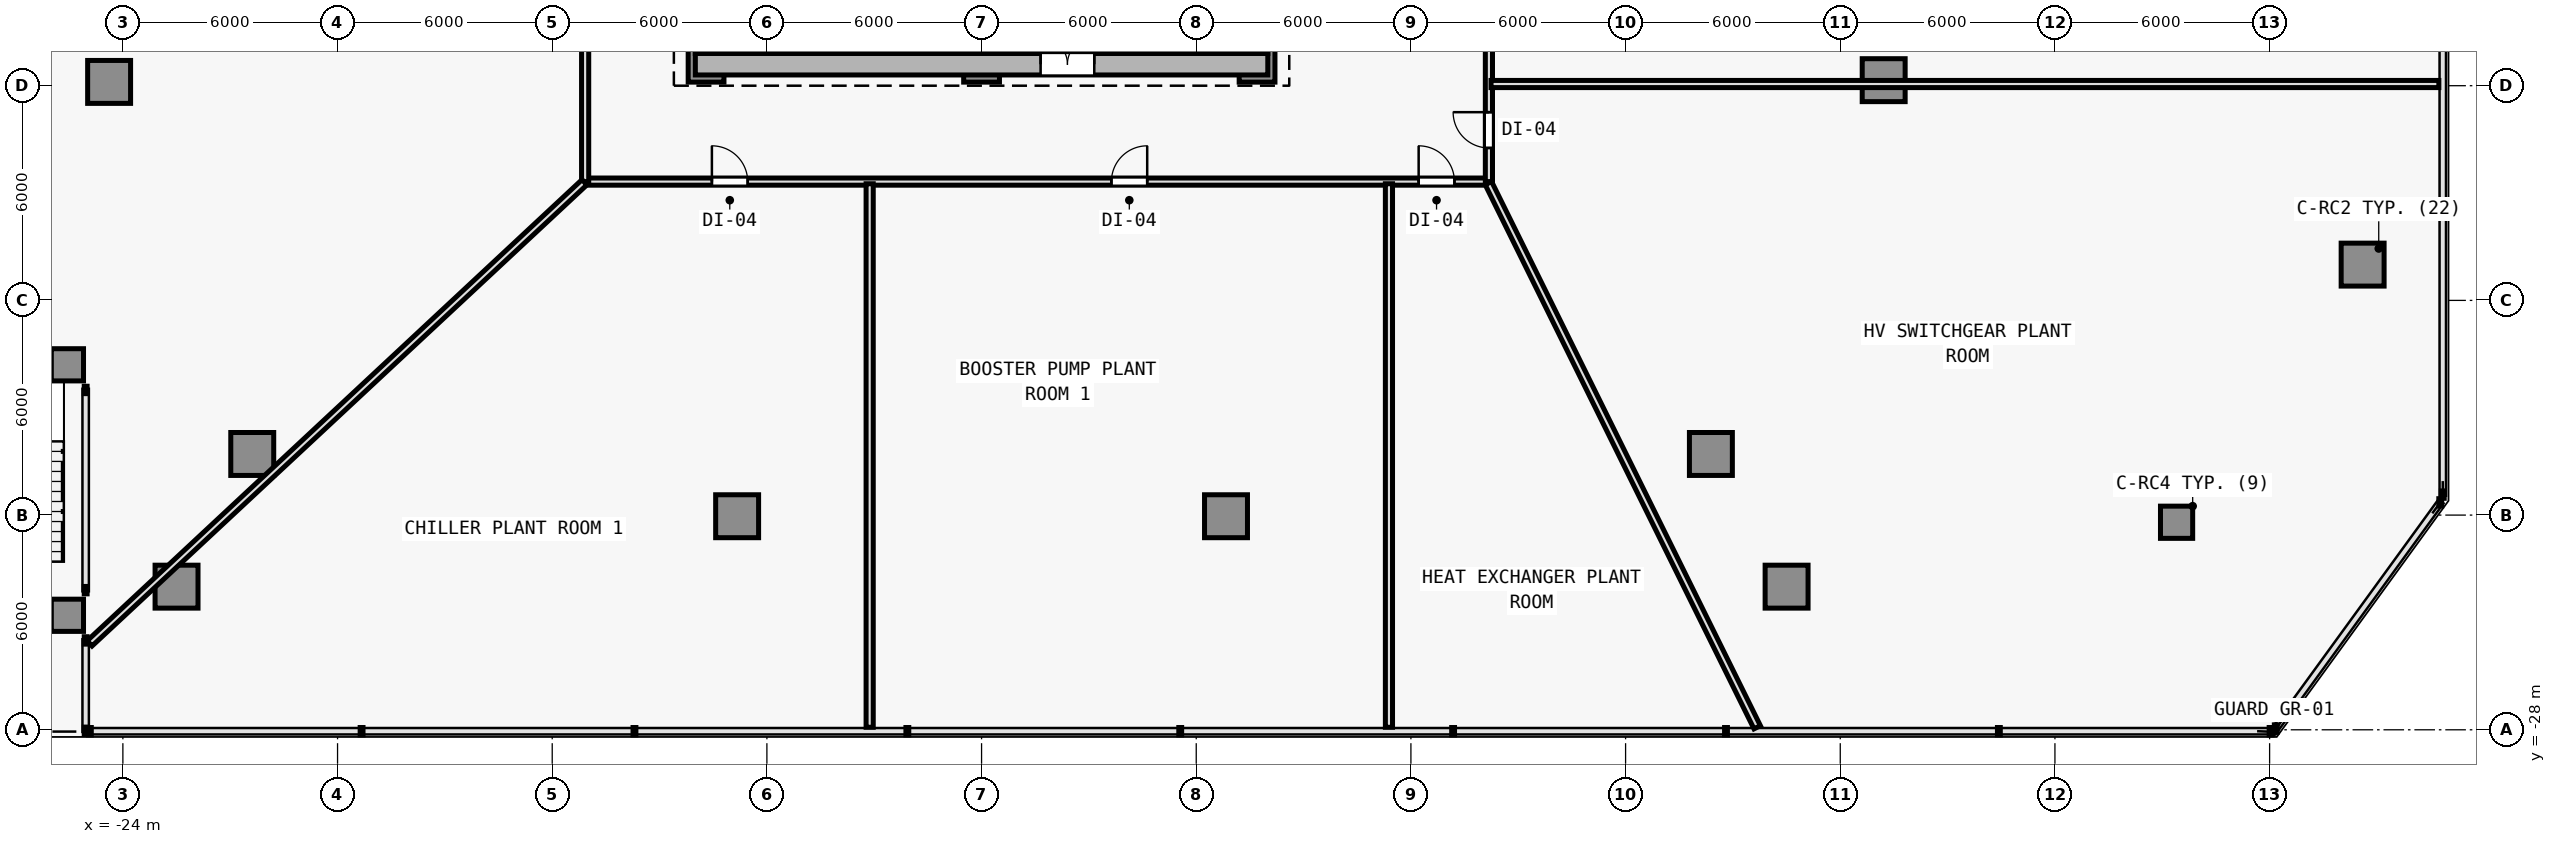
"""IFC4 building model, lengths in metres.
Left out: names, types, materials, properties, quantities, classifications, styles, units other than length and angle.
Written with IfcOpenShell. Run it as: python <this file> out.ifc"""

import sys

from ifc_helpers import new_model, si_unit, direction, frame, frame_2d, origin, origin_2d, place, context, subcontext, project, spatial, rectangle, extrude, element, fill, save


model = new_model("IFC4")
c1 = context("Model", 3, precision=1e-05, world=origin(), true_north=direction((0.0, 1.0)))
c2 = subcontext(c1, "Body", "Model", "MODEL_VIEW")
j1 = project(units=[si_unit("LENGTHUNIT", "METRE"), si_unit("PLANEANGLEUNIT", "RADIAN")], contexts=[c1])
p1 = place(None, origin())
s1 = spatial("IfcSite", under=j1, at=p1, CompositionType="ELEMENT")
p2 = place(p1, origin())
s2 = spatial("IfcBuilding", under=s1, at=p2, CompositionType="ELEMENT")
p3 = place(p2, frame((0.0, 0.0, 21.8)))
s3 = spatial("IfcBuildingStorey", under=s2, at=p3, CompositionType="ELEMENT", Elevation=21.8)
for number, where, z_axis, x_axis in (
    (1, (-7.7, -9.4, 0.0), (0.0, 0.0, 1.0), (1.0, 0.0, 0.0)),
    (2, (7.7, -9.4, 0.0), (0.0, 0.0, 1.0), (1.0, 0.0, 0.0)),
    (3, (0.0, -9.4, 0.0), (0.0, 0.0, 1.0), (1.0, 0.0, 0.0)),
):
    element("IfcColumn", number, at=place(p3, frame(where, z_axis=z_axis, x_axis=x_axis)), inside=s3, PredefinedType="COLUMN", context=c2, shape_type="SweptSolid", body=[
        extrude(rectangle(XDim=1.0, YDim=1.0, at=origin_2d()), origin(), (0.0, 0.0, 1.0), 4.6),
    ])
for number, where, z_axis, x_axis in (
    (4, (38.6, -15.0, 0.0), (0.0, 0.0, 1.0), (1.0, 0.0, 0.0)),
    (5, (-22.5, -24.0, 0.0), (0.0, 0.0, 1.0), (1.0, 0.0, 0.0)),
    (6, (22.5, -24.0, 0.0), (0.0, 0.0, 1.0), (1.0, 0.0, 0.0)),
    (7, (-20.384, -20.292, 0.0), (0.0, 0.0, 1.0), (1.0, 0.0, 0.0)),
    (8, (-6.832, -22.032, 0.0), (0.0, 0.0, 1.0), (1.0, 0.0, 0.0)),
    (9, (6.832, -22.032, 0.0), (0.0, 0.0, 1.0), (1.0, 0.0, 0.0)),
    (10, (20.384, -20.292, 0.0), (0.0, 0.0, 1.0), (1.0, 0.0, 0.0)),
    (11, (25.213, -9.845, 0.0), (0.0, 0.0, 1.0), (1.0, 0.0, 0.0)),
    (12, (-24.385, -9.894, 0.0), (0.0, 0.0, 1.0), (1.0, 0.0, 0.0)),
):
    element("IfcColumn", number, at=place(p3, frame(where, z_axis=z_axis, x_axis=x_axis)), inside=s3, PredefinedType="COLUMN", context=c2, shape_type="SweptSolid", body=[
        extrude(rectangle(XDim=1.2, YDim=1.2, at=origin_2d()), origin(), (0.0, 0.0, 1.0), 4.6),
    ])
for number, where, z_axis, x_axis in (
    (13, (33.4, -22.2, 0.0), (0.0, 0.0, 1.0), (1.0, 0.0, 0.0)),
    (14, (-25.55, -24.8, 0.0), (0.0, 0.0, 1.0), (1.0, 0.0, 0.0)),
    (15, (-25.55, -17.8, 0.0), (0.0, 0.0, 1.0), (1.0, 0.0, 0.0)),
):
    element("IfcColumn", number, at=place(p3, frame(where, z_axis=z_axis, x_axis=x_axis)), inside=s3, PredefinedType="COLUMN", context=c2, shape_type="SweptSolid", body=[
        extrude(rectangle(XDim=0.9, YDim=0.9, at=origin_2d()), origin(), (0.0, 0.0, 1.0), 4.6),
    ])
p4 = place(p3, frame((-8.0, -9.4, 0.0), z_axis=(0.0, 0.0, 1.0), x_axis=(1.0, 0.0, 0.0)))
e16 = element("IfcWall", 16, at=p4, inside=s3, PredefinedType="SHEAR", context=c2, shape_type="SweptSolid", body=[
    extrude(rectangle(XDim=16.0, YDim=0.6, at=frame_2d((8.0, 0.0))), origin(), (0.0, 0.0, 1.0), 4.35),
])
p5 = place(p4, frame((9.65, 0.0, 0.0)))
e17 = element("IfcOpeningElement", 17, at=p5, cuts=e16, PredefinedType="OPENING", context=c2, shape_type="SweptSolid", body=[
    extrude(rectangle(XDim=1.5, YDim=2.2, at=frame_2d((0.75, 1.1))), frame((0.0, 0.31, 0.0), z_axis=(0.0, -1.0, 0.0), x_axis=(1.0, 0.0, 0.0)), (0.0, 0.0, 1.0), 0.62),
])
p6 = place(p3, frame((-7.7, -9.1, 0.0), z_axis=(0.0, 0.0, 1.0), x_axis=(0.0, 1.0, 0.0)))
e18 = element("IfcWall", 18, at=p6, inside=s3, PredefinedType="SHEAR", context=c2, shape_type="SweptSolid", body=[
    extrude(rectangle(XDim=19.0, YDim=0.6, at=frame_2d((9.5, 0.0))), origin(), (0.0, 0.0, 1.0), 4.35),
])
p7 = place(p6, frame((12.65, 0.0, 0.0)))
e19 = element("IfcOpeningElement", 19, at=p7, cuts=e18, PredefinedType="OPENING", context=c2, shape_type="SweptSolid", body=[
    extrude(rectangle(XDim=1.1, YDim=2.15, at=frame_2d((0.55, 1.075))), frame((0.0, 0.31, 0.0), z_axis=(0.0, -1.0, 0.0), x_axis=(1.0, 0.0, 0.0)), (0.0, 0.0, 1.0), 0.62),
])
p8 = place(p3, frame((7.7, 9.9, 0.0), z_axis=(0.0, 0.0, 1.0), x_axis=(0.0, -1.0, 0.0)))
e20 = element("IfcWall", 20, at=p8, inside=s3, PredefinedType="SHEAR", context=c2, shape_type="SweptSolid", body=[
    extrude(rectangle(XDim=19.0, YDim=0.6, at=frame_2d((9.5, 0.0))), origin(), (0.0, 0.0, 1.0), 4.35),
])
p9 = place(p3, frame((-1.25, -9.095, 0.0), z_axis=(0.0, 0.0, 1.0), x_axis=(0.0, 1.0, 0.0)))
e21 = element("IfcWall", 21, at=p9, inside=s3, PredefinedType="PARTITIONING", context=c2, shape_type="SweptSolid", body=[
    extrude(rectangle(XDim=3.045, YDim=0.15, at=frame_2d((1.522, 0.0))), origin(), (0.0, 0.0, 1.0), 4.35),
])
p10 = place(p9, frame((0.845, 0.0, 0.0)))
e22 = element("IfcOpeningElement", 22, at=p10, cuts=e21, PredefinedType="OPENING", context=c2, shape_type="SweptSolid", body=[
    extrude(rectangle(XDim=0.95, YDim=2.1, at=frame_2d((0.475, 1.05))), frame((0.0, 0.085, 0.0), z_axis=(0.0, -1.0, 0.0), x_axis=(1.0, 0.0, 0.0)), (0.0, 0.0, 1.0), 0.17),
])
p11 = place(p3, frame((4.15, -9.095, 0.0), z_axis=(0.0, 0.0, 1.0), x_axis=(0.0, 1.0, 0.0)))
e23 = element("IfcWall", 23, at=p11, inside=s3, PredefinedType="PARTITIONING", context=c2, shape_type="SweptSolid", body=[
    extrude(rectangle(XDim=3.045, YDim=0.15, at=frame_2d((1.522, 0.0))), origin(), (0.0, 0.0, 1.0), 4.35),
])
p12 = place(p11, frame((0.845, 0.0, 0.0)))
e24 = element("IfcOpeningElement", 24, at=p12, cuts=e23, PredefinedType="OPENING", context=c2, shape_type="SweptSolid", body=[
    extrude(rectangle(XDim=0.9, YDim=2.1, at=frame_2d((0.45, 1.05))), frame((0.0, 0.085, 0.0), z_axis=(0.0, -1.0, 0.0), x_axis=(1.0, 0.0, 0.0)), (0.0, 0.0, 1.0), 0.17),
])
p13 = place(p3, frame((-4.3, -9.095, 0.0), z_axis=(0.0, 0.0, 1.0), x_axis=(0.0, 1.0, 0.0)))
e25 = element("IfcWall", 25, at=p13, inside=s3, PredefinedType="PARTITIONING", context=c2, shape_type="SweptSolid", body=[
    extrude(rectangle(XDim=3.045, YDim=0.15, at=frame_2d((1.522, 0.0))), origin(), (0.0, 0.0, 1.0), 4.35),
])
p14 = place(p13, frame((0.845, 0.0, 0.0)))
e26 = element("IfcOpeningElement", 26, at=p14, cuts=e25, PredefinedType="OPENING", context=c2, shape_type="SweptSolid", body=[
    extrude(rectangle(XDim=0.9, YDim=2.1, at=frame_2d((0.45, 1.05))), frame((0.0, 0.085, 0.0), z_axis=(0.0, -1.0, 0.0), x_axis=(1.0, 0.0, 0.0)), (0.0, 0.0, 1.0), 0.17),
])
p15 = place(p3, frame((-11.1, -12.68, 0.0), z_axis=(0.0, 0.0, 1.0), x_axis=(1.0, 0.0, 0.0)))
e27 = element("IfcWall", 27, at=p15, inside=s3, PredefinedType="SOLIDWALL", context=c2, shape_type="SweptSolid", body=[
    extrude(rectangle(XDim=25.3, YDim=0.2, at=frame_2d((12.65, 0.0))), origin(), (0.0, 0.0, 1.0), 3.317),
])
p16 = place(p15, frame((3.563, 0.0, 0.0)))
e28 = element("IfcOpeningElement", 28, at=p16, cuts=e27, PredefinedType="OPENING", context=c2, shape_type="SweptSolid", body=[
    extrude(rectangle(XDim=1.0, YDim=2.15, at=frame_2d((0.5, 1.075))), frame((0.0, 0.11, 0.0), z_axis=(0.0, -1.0, 0.0), x_axis=(1.0, 0.0, 0.0)), (0.0, 0.0, 1.0), 0.22),
])
p17 = place(p15, frame((14.729, 0.0, 0.0)))
e29 = element("IfcOpeningElement", 29, at=p17, cuts=e27, PredefinedType="OPENING", context=c2, shape_type="SweptSolid", body=[
    extrude(rectangle(XDim=1.0, YDim=2.15, at=frame_2d((0.5, 1.075))), frame((0.0, 0.11, 0.0), z_axis=(0.0, -1.0, 0.0), x_axis=(1.0, 0.0, 0.0)), (0.0, 0.0, 1.0), 0.22),
])
p18 = place(p15, frame((23.316, 0.0, 0.0)))
e30 = element("IfcOpeningElement", 30, at=p18, cuts=e27, PredefinedType="OPENING", context=c2, shape_type="SweptSolid", body=[
    extrude(rectangle(XDim=1.0, YDim=2.15, at=frame_2d((0.5, 1.075))), frame((0.0, 0.11, 0.0), z_axis=(0.0, -1.0, 0.0), x_axis=(1.0, 0.0, 0.0)), (0.0, 0.0, 1.0), 0.22),
])
p19 = place(p3, frame((-11.08, -12.68, 0.0), z_axis=(0.0, 0.0, 1.0), x_axis=(0.0, 1.0, 0.0)))
e31 = element("IfcWall", 31, at=p19, inside=s3, PredefinedType="SOLIDWALL", context=c2, shape_type="SweptSolid", body=[
    extrude(rectangle(XDim=26.16, YDim=0.2, at=frame_2d((13.08, 0.0))), origin(), (0.0, 0.0, 1.0), 3.025),
])
p20 = place(p19, frame((4.02, 0.0, 0.0)))
e32 = element("IfcOpeningElement", 32, at=p20, cuts=e31, PredefinedType="OPENING", context=c2, shape_type="SweptSolid", body=[
    extrude(rectangle(XDim=1.0, YDim=2.15, at=frame_2d((0.5, 1.075))), frame((0.0, 0.11, 0.0), z_axis=(0.0, -1.0, 0.0), x_axis=(1.0, 0.0, 0.0)), (0.0, 0.0, 1.0), 0.22),
])
p21 = place(p19, frame((24.22, 0.0, 0.0)))
e33 = element("IfcOpeningElement", 33, at=p21, cuts=e31, PredefinedType="OPENING", context=c2, shape_type="SweptSolid", body=[
    extrude(rectangle(XDim=1.0, YDim=2.15, at=frame_2d((0.5, 1.075))), frame((0.0, 0.11, 0.0), z_axis=(0.0, -1.0, 0.0), x_axis=(1.0, 0.0, 0.0)), (0.0, 0.0, 1.0), 0.22),
])
p22 = place(p19, frame((15.66, 0.0, 0.0)))
e34 = element("IfcOpeningElement", 34, at=p22, cuts=e31, PredefinedType="OPENING", context=c2, shape_type="SweptSolid", body=[
    extrude(rectangle(XDim=1.0, YDim=2.15, at=frame_2d((0.5, 1.075))), frame((0.0, 0.11, 0.0), z_axis=(0.0, -1.0, 0.0), x_axis=(1.0, 0.0, 0.0)), (0.0, 0.0, 1.0), 0.22),
])
p23 = place(p3, frame((14.18, -12.68, 0.0), z_axis=(0.0, 0.0, 1.0), x_axis=(0.0, 1.0, 0.0)))
e35 = element("IfcWall", 35, at=p23, inside=s3, PredefinedType="SOLIDWALL", context=c2, shape_type="SweptSolid", body=[
    extrude(rectangle(XDim=26.16, YDim=0.2, at=frame_2d((13.08, 0.0))), origin(), (0.0, 0.0, 1.0), 3.025),
])
p24 = place(p23, frame((0.94, 0.0, 0.0)))
e36 = element("IfcOpeningElement", 36, at=p24, cuts=e35, PredefinedType="OPENING", context=c2, shape_type="SweptSolid", body=[
    extrude(rectangle(XDim=1.0, YDim=2.15, at=frame_2d((0.5, 1.075))), frame((0.0, 0.11, 0.0), z_axis=(0.0, -1.0, 0.0), x_axis=(1.0, 0.0, 0.0)), (0.0, 0.0, 1.0), 0.22),
])
p25 = place(p23, frame((9.5, 0.0, 0.0)))
e37 = element("IfcOpeningElement", 37, at=p25, cuts=e35, PredefinedType="OPENING", context=c2, shape_type="SweptSolid", body=[
    extrude(rectangle(XDim=1.0, YDim=2.15, at=frame_2d((0.5, 1.075))), frame((0.0, 0.11, 0.0), z_axis=(0.0, -1.0, 0.0), x_axis=(1.0, 0.0, 0.0)), (0.0, 0.0, 1.0), 0.22),
])
p26 = place(p23, frame((21.14, 0.0, 0.0)))
e38 = element("IfcOpeningElement", 38, at=p26, cuts=e35, PredefinedType="OPENING", context=c2, shape_type="SweptSolid", body=[
    extrude(rectangle(XDim=1.0, YDim=2.15, at=frame_2d((0.5, 1.075))), frame((0.0, 0.11, 0.0), z_axis=(0.0, -1.0, 0.0), x_axis=(1.0, 0.0, 0.0)), (0.0, 0.0, 1.0), 0.22),
])
p27 = place(p3, frame((-11.099, -12.699, 0.0), z_axis=(0.0, 0.0, 1.0), x_axis=(-0.731636066653, -0.681695434906, 0.0)))
e39 = element("IfcWall", 39, at=p27, inside=s3, PredefinedType="SOLIDWALL", context=c2, shape_type="SweptSolid", body=[
    extrude(rectangle(XDim=18.904, YDim=0.2, at=frame_2d((9.452, 0.0))), origin(), (0.0, 0.0, 1.0), 2.925),
])
p28 = place(p3, frame((-3.127, -12.74, 0.0), z_axis=(0.0, 0.0, 1.0), x_axis=(0.0, -1.0, 0.0)))
e40 = element("IfcWall", 40, at=p28, inside=s3, PredefinedType="SOLIDWALL", context=c2, shape_type="SweptSolid", body=[
    extrude(rectangle(XDim=15.19, YDim=0.2, at=frame_2d((7.595, 0.0))), origin(), (0.0, 0.0, 1.0), 3.025),
])
p29 = place(p3, frame((11.386, -12.74, 0.0), z_axis=(0.0, 0.0, 1.0), x_axis=(0.0, -1.0, 0.0)))
e41 = element("IfcWall", 41, at=p29, inside=s3, PredefinedType="SOLIDWALL", context=c2, shape_type="SweptSolid", body=[
    extrude(rectangle(XDim=15.19, YDim=0.2, at=frame_2d((7.595, 0.0))), origin(), (0.0, 0.0, 1.0), 2.925),
])
p30 = place(p3, frame((14.166, -12.723, 0.0), z_axis=(0.0, 0.0, 1.0), x_axis=(0.442919028599, -0.896561617573, 0.0)))
e42 = element("IfcWall", 42, at=p30, inside=s3, PredefinedType="SOLIDWALL", context=c2, shape_type="SweptSolid", body=[
    extrude(rectangle(XDim=16.961, YDim=0.2, at=frame_2d((8.48, 0.0))), origin(), (0.0, 0.0, 1.0), 2.925),
])
p31 = place(p3, frame((14.24, -9.953, 0.0), z_axis=(0.0, 0.0, 1.0), x_axis=(1.0, 0.0, 0.0)))
e43 = element("IfcWall", 43, at=p31, inside=s3, PredefinedType="SOLIDWALL", context=c2, shape_type="SweptSolid", body=[
    extrude(rectangle(XDim=26.49, YDim=0.2, at=frame_2d((13.245, 0.0))), origin(), (0.0, 0.0, 1.0), 2.925),
])
p32 = place(p5, origin())
e44 = element("IfcDoor", 44, at=p32, inside=s3, OperationType="DOUBLE_DOOR_SINGLE_SWING", PredefinedType="DOOR", context=c2, shape_type="SweptSolid", body=[
    extrude(rectangle(XDim=1.5, YDim=2.2, at=frame_2d((0.75, 1.1))), frame((0.0, 0.025, 0.0), z_axis=(0.0, -1.0, 0.0), x_axis=(1.0, 0.0, 0.0)), (0.0, 0.0, 1.0), 0.05),
])
fill(e17, e44)
p33 = place(p16, origin())
e45 = element("IfcDoor", 45, at=p33, inside=s3, OperationType="SINGLE_SWING_LEFT", PredefinedType="DOOR", context=c2, shape_type="SweptSolid", body=[
    extrude(rectangle(XDim=1.0, YDim=2.15, at=frame_2d((0.5, 1.075))), frame((0.0, 0.025, 0.0), z_axis=(0.0, -1.0, 0.0), x_axis=(1.0, 0.0, 0.0)), (0.0, 0.0, 1.0), 0.05),
])
fill(e28, e45)
p34 = place(p17, origin())
e46 = element("IfcDoor", 46, at=p34, inside=s3, OperationType="SINGLE_SWING_RIGHT", PredefinedType="DOOR", context=c2, shape_type="SweptSolid", body=[
    extrude(rectangle(XDim=1.0, YDim=2.15, at=frame_2d((0.5, 1.075))), frame((0.0, 0.025, 0.0), z_axis=(0.0, -1.0, 0.0), x_axis=(1.0, 0.0, 0.0)), (0.0, 0.0, 1.0), 0.05),
])
fill(e29, e46)
p35 = place(p18, origin())
e47 = element("IfcDoor", 47, at=p35, inside=s3, OperationType="SINGLE_SWING_LEFT", PredefinedType="DOOR", context=c2, shape_type="SweptSolid", body=[
    extrude(rectangle(XDim=1.0, YDim=2.15, at=frame_2d((0.5, 1.075))), frame((0.0, 0.025, 0.0), z_axis=(0.0, -1.0, 0.0), x_axis=(1.0, 0.0, 0.0)), (0.0, 0.0, 1.0), 0.05),
])
fill(e30, e47)
p36 = place(p24, origin())
e48 = element("IfcDoor", 48, at=p36, inside=s3, OperationType="SINGLE_SWING_RIGHT", PredefinedType="DOOR", context=c2, shape_type="SweptSolid", body=[
    extrude(rectangle(XDim=1.0, YDim=2.15, at=frame_2d((0.5, 1.075))), frame((0.0, 0.025, 0.0), z_axis=(0.0, -1.0, 0.0), x_axis=(1.0, 0.0, 0.0)), (0.0, 0.0, 1.0), 0.05),
])
fill(e36, e48)
save(model, sys.argv[1])
